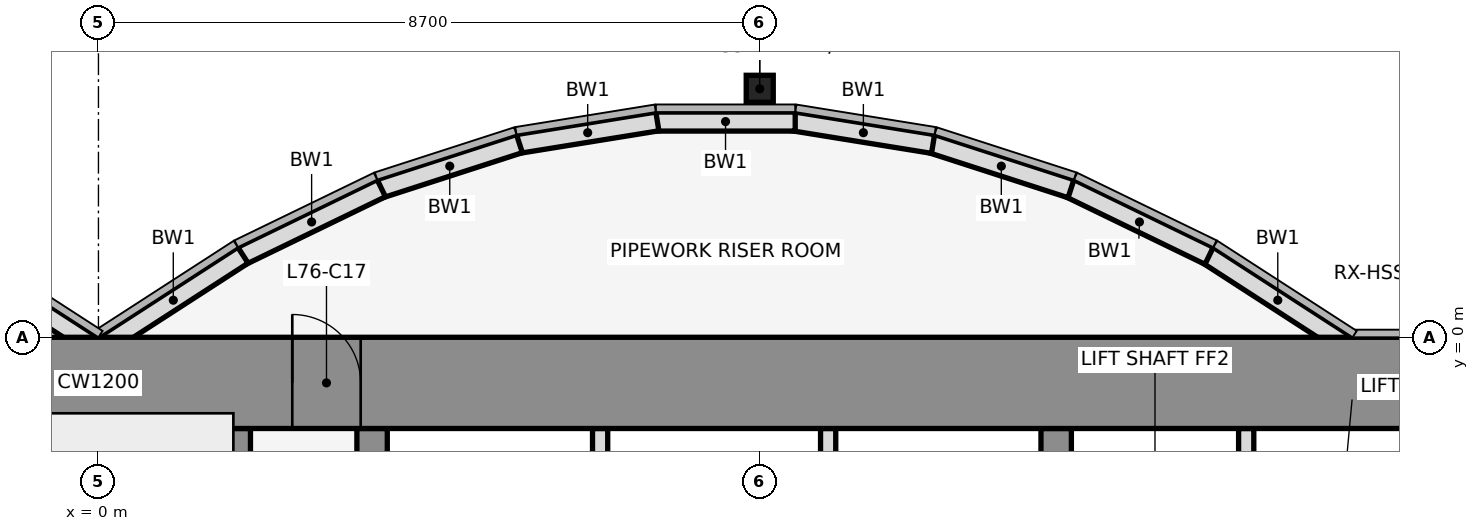
"""IFC4 building model, lengths in metres.
Left out: names, types, materials, properties, quantities, classifications, styles, units other than length and angle.
Written with IfcOpenShell. Run it as: python <this file> out.ifc"""

import sys

from ifc_helpers import new_model, si_unit, direction, frame, frame_2d, origin, origin_2d, place, context, subcontext, project, spatial, rectangle, hollow_rectangle, extrude, element, fill, save


model = new_model("IFC4")
c1 = context("Model", 3, precision=1e-05, world=origin(), true_north=direction((0.0, 1.0)))
c2 = subcontext(c1, "Body", "Model", "MODEL_VIEW")
j1 = project(units=[si_unit("LENGTHUNIT", "METRE"), si_unit("PLANEANGLEUNIT", "RADIAN")], contexts=[c1])
p1 = place(None, origin())
s1 = spatial("IfcSite", under=j1, at=p1, CompositionType="ELEMENT")
p2 = place(p1, origin())
s2 = spatial("IfcBuilding", under=s1, at=p2, CompositionType="ELEMENT")
p3 = place(p2, frame((0.0, 0.0, 338.0)))
s3 = spatial("IfcBuildingStorey", under=s2, at=p3, CompositionType="ELEMENT", Elevation=338.0)
p4 = place(p3, frame((8.7, 3.269, 0.0), z_axis=(0.0, 0.0, 1.0), x_axis=(1.0, 0.0, 0.0)))
e1 = element("IfcColumn", 1, at=p4, inside=s3, PredefinedType="COLUMN", context=c2, shape_type="SweptSolid", body=[
    extrude(hollow_rectangle(XDim=0.356, YDim=0.356, WallThickness=0.012, at=origin_2d()), origin(), (0.0, 0.0, 1.0), 4.5),
])
p5 = place(p3, frame((16.432, -0.105, 0.0), z_axis=(0.0, 0.0, 1.0), x_axis=(-0.83981312244, 0.542875602121, 0.0)))
e2 = element("IfcWall", 2, at=p5, inside=s3, PredefinedType="STANDARD", context=c2, shape_type="SweptSolid", body=[
    extrude(rectangle(XDim=2.183, YDim=0.25, at=frame_2d((1.091, 0.0))), origin(), (0.0, 0.0, 1.0), 4.3),
])
p6 = place(p3, frame((14.612, 1.073, 0.0), z_axis=(0.0, 0.0, 1.0), x_axis=(-0.89982408427, 0.436252928206, 0.0)))
e3 = element("IfcWall", 3, at=p6, inside=s3, PredefinedType="STANDARD", context=c2, shape_type="SweptSolid", body=[
    extrude(rectangle(XDim=2.038, YDim=0.25, at=frame_2d((1.019, 0.0))), origin(), (0.0, 0.0, 1.0), 4.3),
])
p7 = place(p3, frame((12.795, 1.955, 0.0), z_axis=(0.0, 0.0, 1.0), x_axis=(-0.951495806175, 0.307661714928, 0.0)))
e4 = element("IfcWall", 4, at=p7, inside=s3, PredefinedType="STANDARD", context=c2, shape_type="SweptSolid", body=[
    extrude(rectangle(XDim=1.927, YDim=0.25, at=frame_2d((0.963, 0.0))), origin(), (0.0, 0.0, 1.0), 4.3),
])
p8 = place(p3, frame((10.98, 2.543, 0.0), z_axis=(0.0, 0.0, 1.0), x_axis=(-0.987181718931, 0.159600293885, 0.0)))
e5 = element("IfcWall", 5, at=p8, inside=s3, PredefinedType="STANDARD", context=c2, shape_type="SweptSolid", body=[
    extrude(rectangle(XDim=1.857, YDim=0.25, at=frame_2d((0.929, 0.0))), origin(), (0.0, 0.0, 1.0), 4.3),
])
p9 = place(p3, frame((9.167, 2.838, 0.0), z_axis=(0.0, 0.0, 1.0), x_axis=(-1.0, 0.0, 0.0)))
e6 = element("IfcWall", 6, at=p9, inside=s3, PredefinedType="STANDARD", context=c2, shape_type="SweptSolid", body=[
    extrude(rectangle(XDim=1.833, YDim=0.25, at=frame_2d((0.917, 0.0))), origin(), (0.0, 0.0, 1.0), 4.3),
])
p10 = place(p3, frame((7.353, 2.84, 0.0), z_axis=(0.0, 0.0, 1.0), x_axis=(-0.987181718931, -0.159600293885, 0.0)))
e7 = element("IfcWall", 7, at=p10, inside=s3, PredefinedType="STANDARD", context=c2, shape_type="SweptSolid", body=[
    extrude(rectangle(XDim=1.857, YDim=0.25, at=frame_2d((0.929, 0.0))), origin(), (0.0, 0.0, 1.0), 4.3),
])
p11 = place(p3, frame((5.538, 2.548, 0.0), z_axis=(0.0, 0.0, 1.0), x_axis=(-0.951495806175, -0.307661714928, 0.0)))
e8 = element("IfcWall", 8, at=p11, inside=s3, PredefinedType="STANDARD", context=c2, shape_type="SweptSolid", body=[
    extrude(rectangle(XDim=1.927, YDim=0.25, at=frame_2d((0.963, 0.0))), origin(), (0.0, 0.0, 1.0), 4.3),
])
p12 = place(p3, frame((3.721, 1.962, 0.0), z_axis=(0.0, 0.0, 1.0), x_axis=(-0.89982408427, -0.436252928206, 0.0)))
e9 = element("IfcWall", 9, at=p12, inside=s3, PredefinedType="STANDARD", context=c2, shape_type="SweptSolid", body=[
    extrude(rectangle(XDim=2.038, YDim=0.25, at=frame_2d((1.019, 0.0))), origin(), (0.0, 0.0, 1.0), 4.3),
])
for number, where, z_axis, x_axis in (
    (10, (1.901, 1.08, 0.0), (0.0, 0.0, 1.0), (-0.84, -0.543, 0.0)),
    (11, (-0.068, -0.105, 0.0), (0.0, 0.0, 1.0), (-0.84, 0.543, 0.0)),
):
    element("IfcWall", number, at=place(p3, frame(where, z_axis=z_axis, x_axis=x_axis)), inside=s3, PredefinedType="STANDARD", context=c2, shape_type="SweptSolid", body=[
        extrude(rectangle(XDim=2.183, YDim=0.25, at=frame_2d((1.091, 0.0))), origin(), (0.0, 0.0, 1.0), 4.3),
    ])
p13 = place(p3, frame((1.8, -11.8, 0.0), z_axis=(0.0, 0.0, 1.0), x_axis=(0.0, 1.0, 0.0)))
e12 = element("IfcWall", 12, at=p13, inside=s3, PredefinedType="SHEAR", context=c2, shape_type="SweptSolid", body=[
    extrude(rectangle(XDim=10.6, YDim=0.4, at=frame_2d((5.3, 0.0))), origin(), (0.0, 0.0, 1.0), 4.5),
])
p14 = place(p3, frame((3.6, -11.8, 0.0), z_axis=(0.0, 0.0, 1.0), x_axis=(0.0, 1.0, 0.0)))
e13 = element("IfcWall", 13, at=p14, inside=s3, PredefinedType="SHEAR", context=c2, shape_type="SweptSolid", body=[
    extrude(rectangle(XDim=10.6, YDim=0.4, at=frame_2d((5.3, 0.0))), origin(), (0.0, 0.0, 1.0), 4.5),
])
p15 = place(p14, frame((1.35, 0.0, 0.0)))
e14 = element("IfcOpeningElement", 14, at=p15, cuts=e13, PredefinedType="OPENING", context=c2, shape_type="SweptSolid", body=[
    extrude(rectangle(XDim=0.9, YDim=2.1, at=frame_2d((0.45, 1.05))), frame((0.0, 0.212, 0.0), z_axis=(0.0, -1.0, 0.0), x_axis=(1.0, 0.0, 0.0)), (0.0, 0.0, 1.0), 0.424),
])
for number, where, z_axis, x_axis in (
    (15, (6.6, -4.6, 0.0), (0.0, 0.0, 1.0), (0.0, 1.0, 0.0)),
    (16, (9.6, -4.6, 0.0), (0.0, 0.0, 1.0), (0.0, 1.0, 0.0)),
):
    element("IfcWall", number, at=place(p3, frame(where, z_axis=z_axis, x_axis=x_axis)), inside=s3, PredefinedType="PARTITIONING", context=c2, shape_type="SweptSolid", body=[
        extrude(rectangle(XDim=3.4, YDim=0.2, at=frame_2d((1.7, 0.0))), origin(), (0.0, 0.0, 1.0), 3.368),
    ])
p16 = place(p3, frame((12.6, -11.8, 0.0), z_axis=(0.0, 0.0, 1.0), x_axis=(0.0, 1.0, 0.0)))
e17 = element("IfcWall", 17, at=p16, inside=s3, PredefinedType="SHEAR", context=c2, shape_type="SweptSolid", body=[
    extrude(rectangle(XDim=10.6, YDim=0.4, at=frame_2d((5.3, 0.0))), origin(), (0.0, 0.0, 1.0), 4.5),
])
p17 = place(p16, frame((4.75, 0.0, 0.0)))
e18 = element("IfcOpeningElement", 18, at=p17, cuts=e17, PredefinedType="OPENING", context=c2, shape_type="SweptSolid", body=[
    extrude(rectangle(XDim=1.1, YDim=2.1, at=frame_2d((0.55, 1.05))), frame((0.0, 0.212, 0.0), z_axis=(0.0, -1.0, 0.0), x_axis=(1.0, 0.0, 0.0)), (0.0, 0.0, 1.0), 0.424),
])
p18 = place(p3, frame((15.1, -4.6, 0.0), z_axis=(0.0, 0.0, 1.0), x_axis=(0.0, 1.0, 0.0)))
e19 = element("IfcWall", 19, at=p18, inside=s3, PredefinedType="PARTITIONING", context=c2, shape_type="SweptSolid", body=[
    extrude(rectangle(XDim=3.4, YDim=0.2, at=frame_2d((1.7, 0.0))), origin(), (0.0, 0.0, 1.0), 3.368),
])
p19 = place(p3, frame((-22.0, -0.6, 0.0), z_axis=(0.0, 0.0, 1.0), x_axis=(1.0, 0.0, 0.0)))
e20 = element("IfcWall", 20, at=p19, inside=s3, PredefinedType="SHEAR", context=c2, shape_type="SweptSolid", body=[
    extrude(rectangle(XDim=44.0, YDim=1.2, at=frame_2d((22.0, 0.0))), origin(), (0.0, 0.0, 1.0), 4.5),
])
p20 = place(p19, frame((18.55, 0.0, 0.0)))
e21 = element("IfcOpeningElement", 21, at=p20, cuts=e20, PredefinedType="OPENING", context=c2, shape_type="SweptSolid", body=[
    extrude(rectangle(XDim=0.9, YDim=2.1, at=frame_2d((0.45, 1.05))), frame((0.0, 0.612, 0.0), z_axis=(0.0, -1.0, 0.0), x_axis=(1.0, 0.0, 0.0)), (0.0, 0.0, 1.0), 1.224),
])
p21 = place(p19, frame((24.55, 0.0, 0.0)))
e22 = element("IfcOpeningElement", 22, at=p21, cuts=e20, PredefinedType="OPENING", context=c2, shape_type="SweptSolid", body=[
    extrude(rectangle(XDim=0.9, YDim=2.1, at=frame_2d((0.45, 1.05))), frame((0.0, 0.612, 0.0), z_axis=(0.0, -1.0, 0.0), x_axis=(1.0, 0.0, 0.0)), (0.0, 0.0, 1.0), 1.224),
])
p22 = place(p21, origin())
e23 = element("IfcDoor", 23, at=p22, inside=s3, OperationType="SINGLE_SWING_LEFT", PredefinedType="DOOR", context=c2, shape_type="SweptSolid", body=[
    extrude(rectangle(XDim=0.9, YDim=2.1, at=frame_2d((0.45, 1.05))), frame((0.0, 0.025, 0.0), z_axis=(0.0, -1.0, 0.0), x_axis=(1.0, 0.0, 0.0)), (0.0, 0.0, 1.0), 0.05),
])
fill(e22, e23)
save(model, sys.argv[1])
